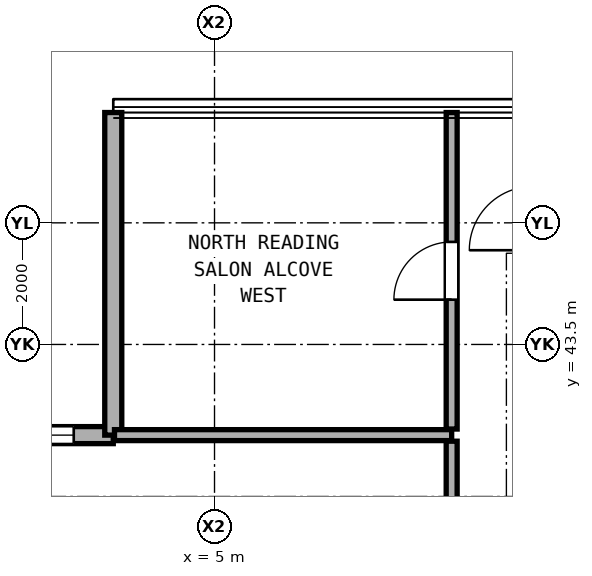
"""IFC4 building model, lengths in metres.
Left out: names, types, materials, properties, quantities, classifications, styles, units other than length and angle.
Written with IfcOpenShell. Run it as: python <this file> out.ifc"""

import sys

from ifc_helpers import new_model, si_unit, direction, frame, frame_2d, origin, place, context, subcontext, project, spatial, rectangle, extrude, element, fill, save


model = new_model("IFC4")
c1 = context("Model", 3, precision=1e-05, world=origin(), true_north=direction((0.0, 1.0)))
c2 = subcontext(c1, "Body", "Model", "MODEL_VIEW")
j1 = project(units=[si_unit("LENGTHUNIT", "METRE"), si_unit("PLANEANGLEUNIT", "RADIAN")], contexts=[c1])
p1 = place(None, origin())
s1 = spatial("IfcSite", under=j1, at=p1, CompositionType="ELEMENT")
p2 = place(p1, origin())
s2 = spatial("IfcBuilding", under=s1, at=p2, CompositionType="ELEMENT")
p3 = place(p2, frame((0.0, 0.0, 114.8)))
s3 = spatial("IfcBuildingStorey", under=s2, at=p3, CompositionType="ELEMENT", Elevation=114.8)
p4 = place(p3, frame((3.335, 42.009, 0.0), z_axis=(0.0, 0.0, 1.0), x_axis=(-1.0, 0.0, 0.0)))
e1 = element("IfcWall", 1, at=p4, inside=s3, PredefinedType="SOLIDWALL", context=c2, shape_type="SweptSolid", body=[
    extrude(rectangle(XDim=5.305, YDim=0.28, at=frame_2d((2.652, 0.0))), origin(), (0.0, 0.0, 1.0), 3.06),
])
p5 = place(p4, frame((0.65, 0.0, 0.85)))
e2 = element("IfcOpeningElement", 2, at=p5, cuts=e1, PredefinedType="OPENING", context=c2, shape_type="SweptSolid", body=[
    extrude(rectangle(XDim=1.1, YDim=2.0, at=frame_2d((0.55, 1.0))), frame((0.0, 0.15, 0.0), z_axis=(0.0, -1.0, 0.0), x_axis=(1.0, 0.0, 0.0)), (0.0, 0.0, 1.0), 0.3),
])
p6 = place(p3, frame((3.335, 47.314, 0.0), z_axis=(0.0, 0.0, 1.0), x_axis=(0.0, -1.0, 0.0)))
e3 = element("IfcWall", 3, at=p6, inside=s3, PredefinedType="SOLIDWALL", context=c2, shape_type="SweptSolid", body=[
    extrude(rectangle(XDim=5.305, YDim=0.28, at=frame_2d((2.652, 0.0))), origin(), (0.0, 0.0, 1.0), 3.06),
])
p7 = place(p3, frame((3.355, 42.009, 0.0), z_axis=(0.0, 0.0, 1.0), x_axis=(1.0, 0.0, 0.0)))
e4 = element("IfcWall", 4, at=p7, inside=s3, PredefinedType="PARTITIONING", context=c2, shape_type="SweptSolid", body=[
    extrude(rectangle(XDim=5.545, YDim=0.18, at=frame_2d((2.772, 0.0))), origin(), (0.0, 0.0, 1.0), 3.08),
])
p8 = place(p3, frame((8.9, 37.13, 0.0), z_axis=(0.0, 0.0, 1.0), x_axis=(0.0, 1.0, 0.0)))
e5 = element("IfcWall", 5, at=p8, inside=s3, PredefinedType="PARTITIONING", context=c2, shape_type="SweptSolid", body=[
    extrude(rectangle(XDim=4.779, YDim=0.18, at=frame_2d((2.39, 0.0))), origin(), (0.0, 0.0, 1.0), 2.456),
])
p9 = place(p8, frame((0.915, 0.0, 0.0)))
e6 = element("IfcOpeningElement", 6, at=p9, cuts=e5, PredefinedType="OPENING", context=c2, shape_type="SweptSolid", body=[
    extrude(rectangle(XDim=1.05, YDim=2.2, at=frame_2d((0.525, 1.1))), frame((0.0, 0.1, 0.0), z_axis=(0.0, -1.0, 0.0), x_axis=(1.0, 0.0, 0.0)), (0.0, 0.0, 1.0), 0.2),
])
p10 = place(p3, frame((8.9, 42.109, 0.0), z_axis=(0.0, 0.0, 1.0), x_axis=(0.0, 1.0, 0.0)))
e7 = element("IfcWall", 7, at=p10, inside=s3, PredefinedType="PARTITIONING", context=c2, shape_type="SweptSolid", body=[
    extrude(rectangle(XDim=5.205, YDim=0.18, at=frame_2d((2.603, 0.0))), origin(), (0.0, 0.0, 1.0), 3.08),
])
p11 = place(p10, frame((2.127, 0.0, 0.0)))
e8 = element("IfcOpeningElement", 8, at=p11, cuts=e7, PredefinedType="OPENING", context=c2, shape_type="SweptSolid", body=[
    extrude(rectangle(XDim=0.95, YDim=2.15, at=frame_2d((0.475, 1.075))), frame((0.0, 0.1, 0.0), z_axis=(0.0, -1.0, 0.0), x_axis=(1.0, 0.0, 0.0)), (0.0, 0.0, 1.0), 0.2),
])
p12 = place(p5, origin())
e9 = element("IfcWindow", 9, at=p12, inside=s3, PartitioningType="SINGLE_PANEL", PredefinedType="WINDOW", context=c2, shape_type="SweptSolid", body=[
    extrude(rectangle(XDim=1.1, YDim=2.0, at=frame_2d((0.55, 1.0))), frame((0.0, 0.03, 0.0), z_axis=(0.0, -1.0, 0.0), x_axis=(1.0, 0.0, 0.0)), (0.0, 0.0, 1.0), 0.06),
])
fill(e2, e9)
p13 = place(p11, origin())
e10 = element("IfcDoor", 10, at=p13, inside=s3, OperationType="SINGLE_SWING_LEFT", PredefinedType="DOOR", context=c2, shape_type="SweptSolid", body=[
    extrude(rectangle(XDim=0.95, YDim=2.15, at=frame_2d((0.475, 1.075))), frame((0.0, 0.025, 0.0), z_axis=(0.0, -1.0, 0.0), x_axis=(1.0, 0.0, 0.0)), (0.0, 0.0, 1.0), 0.05),
])
fill(e8, e10)
save(model, sys.argv[1])
